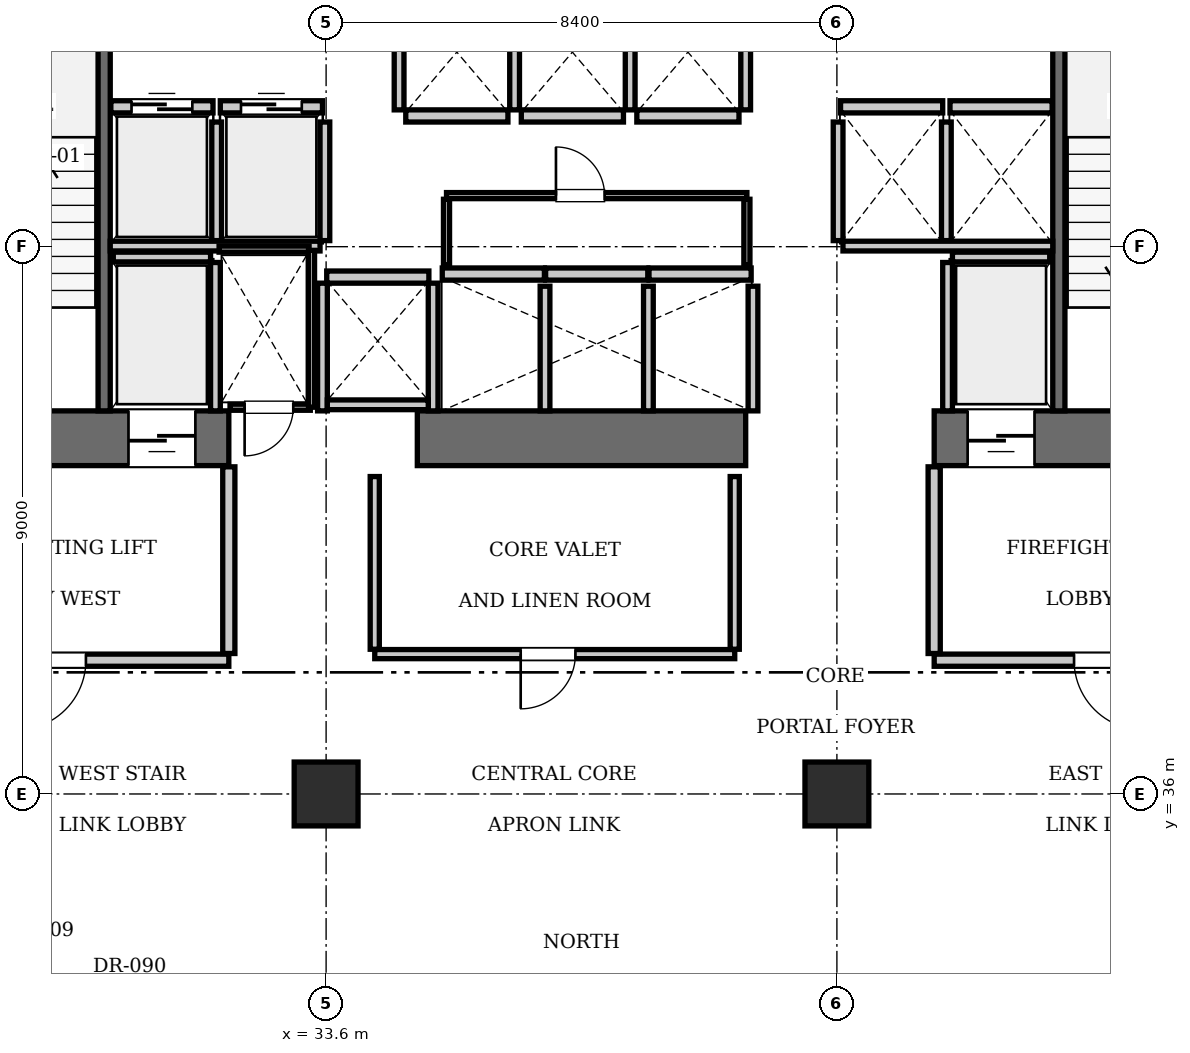
"""IFC4 building model, lengths in metres.
Left out: names, types, materials, properties, quantities, classifications, styles, units other than length and angle.
Written with IfcOpenShell. Run it as: python <this file> out.ifc"""

import sys

from ifc_helpers import new_model, si_unit, direction, frame, frame_2d, origin, origin_2d, place, context, subcontext, project, spatial, rectangle, extrude, element, fill, save


model = new_model("IFC4")
c1 = context("Model", 3, precision=1e-05, world=origin(), true_north=direction((0.0, 1.0)))
c2 = subcontext(c1, "Body", "Model", "MODEL_VIEW")
j1 = project(units=[si_unit("LENGTHUNIT", "METRE"), si_unit("PLANEANGLEUNIT", "RADIAN")], contexts=[c1])
p1 = place(None, origin())
s1 = spatial("IfcSite", under=j1, at=p1, CompositionType="ELEMENT")
p2 = place(p1, origin())
s2 = spatial("IfcBuilding", under=s1, at=p2, CompositionType="ELEMENT")
p3 = place(p2, frame((0.0, 0.0, 30.8)))
s3 = spatial("IfcBuildingStorey", under=s2, at=p3, CompositionType="ELEMENT", Elevation=30.8)
p4 = place(p3, frame((25.2, 41.85, 0.0), z_axis=(0.0, 0.0, 1.0), x_axis=(1.0, 0.0, 0.0)))
e1 = element("IfcWall", 1, at=p4, inside=s3, PredefinedType="SHEAR", context=c2, shape_type="SweptSolid", body=[
    extrude(rectangle(XDim=6.8, YDim=0.9, at=frame_2d((3.4, 0.0))), origin(), (0.0, 0.0, 1.0), 3.85),
])
p5 = place(p4, frame((1.65, 0.0, 0.0)))
e2 = element("IfcOpeningElement", 2, at=p5, cuts=e1, PredefinedType="OPENING", context=c2, shape_type="SweptSolid", body=[
    extrude(rectangle(XDim=1.15, YDim=2.15, at=frame_2d((0.575, 1.075))), frame((0.0, 0.46, 0.0), z_axis=(0.0, -1.0, 0.0), x_axis=(1.0, 0.0, 0.0)), (0.0, 0.0, 1.0), 0.92),
])
p6 = place(p4, frame((5.15, 0.0, 0.0)))
e3 = element("IfcOpeningElement", 3, at=p6, cuts=e1, PredefinedType="OPENING", context=c2, shape_type="SweptSolid", body=[
    extrude(rectangle(XDim=1.1, YDim=2.2, at=frame_2d((0.55, 1.1))), frame((0.0, 0.46, 0.0), z_axis=(0.0, -1.0, 0.0), x_axis=(1.0, 0.0, 0.0)), (0.0, 0.0, 1.0), 0.92),
])
p7 = place(p3, frame((35.1, 41.85, 0.0), z_axis=(0.0, 0.0, 1.0), x_axis=(1.0, 0.0, 0.0)))
e4 = element("IfcWall", 4, at=p7, inside=s3, PredefinedType="SHEAR", context=c2, shape_type="SweptSolid", body=[
    extrude(rectangle(XDim=5.4, YDim=0.9, at=frame_2d((2.7, 0.0))), origin(), (0.0, 0.0, 1.0), 3.85),
])
p8 = place(p3, frame((43.6, 41.85, 0.0), z_axis=(0.0, 0.0, 1.0), x_axis=(1.0, 0.0, 0.0)))
e5 = element("IfcWall", 5, at=p8, inside=s3, PredefinedType="SHEAR", context=c2, shape_type="SweptSolid", body=[
    extrude(rectangle(XDim=6.8, YDim=0.9, at=frame_2d((3.4, 0.0))), origin(), (0.0, 0.0, 1.0), 3.85),
])
p9 = place(p8, frame((3.9, 0.0, 0.0)))
e6 = element("IfcOpeningElement", 6, at=p9, cuts=e5, PredefinedType="OPENING", context=c2, shape_type="SweptSolid", body=[
    extrude(rectangle(XDim=1.15, YDim=2.15, at=frame_2d((0.575, 1.075))), frame((0.0, 0.46, 0.0), z_axis=(0.0, -1.0, 0.0), x_axis=(1.0, 0.0, 0.0)), (0.0, 0.0, 1.0), 0.92),
])
p10 = place(p8, frame((0.55, 0.0, 0.0)))
e7 = element("IfcOpeningElement", 7, at=p10, cuts=e5, PredefinedType="OPENING", context=c2, shape_type="SweptSolid", body=[
    extrude(rectangle(XDim=1.1, YDim=2.2, at=frame_2d((0.55, 1.1))), frame((0.0, 0.46, 0.0), z_axis=(0.0, -1.0, 0.0), x_axis=(1.0, 0.0, 0.0)), (0.0, 0.0, 1.0), 0.92),
])
for number, where, z_axis, x_axis in (
    (8, (33.6, 36.0, 0.0), (0.0, 0.0, 1.0), (1.0, 0.0, 0.0)),
    (9, (42.0, 36.0, 0.0), (0.0, 0.0, 1.0), (1.0, 0.0, 0.0)),
):
    element("IfcColumn", number, at=place(p3, frame(where, z_axis=z_axis, x_axis=x_axis)), inside=s3, PredefinedType="COLUMN", context=c2, shape_type="SweptSolid", body=[
        extrude(rectangle(XDim=1.05, YDim=1.05, at=origin_2d()), origin(), (0.0, 0.0, 1.0), 3.85),
    ])
for number, where, z_axis, x_axis in (
    (10, (29.95, 42.3, 0.0), (0.0, 0.0, 1.0), (0.0, 1.0, 0.0)),
    (11, (45.65, 42.3, 0.0), (0.0, 0.0, 1.0), (0.0, 1.0, 0.0)),
):
    element("IfcWall", number, at=place(p3, frame(where, z_axis=z_axis, x_axis=x_axis)), inside=s3, PredefinedType="SOLIDWALL", context=c2, shape_type="SweptSolid", body=[
        extrude(rectangle(XDim=8.85, YDim=0.2, at=frame_2d((4.425, 0.0))), origin(), (0.0, 0.0, 1.0), 3.61),
    ])
p11 = place(p3, frame((30.06, 47.3, 0.0), z_axis=(0.0, 0.0, 1.0), x_axis=(1.0, 0.0, 0.0)))
e12 = element("IfcWall", 12, at=p11, inside=s3, PredefinedType="SOLIDWALL", context=c2, shape_type="SweptSolid", body=[
    extrude(rectangle(XDim=1.68, YDim=0.2, at=frame_2d((0.84, 0.0))), origin(), (0.0, 0.0, 1.0), 3.61),
])
p12 = place(p11, frame((0.34, 0.0, 0.0)))
e13 = element("IfcOpeningElement", 13, at=p12, cuts=e12, PredefinedType="OPENING", context=c2, shape_type="SweptSolid", body=[
    extrude(rectangle(XDim=1.0, YDim=2.15, at=frame_2d((0.5, 1.075))), frame((0.0, 0.11, 0.0), z_axis=(0.0, -1.0, 0.0), x_axis=(1.0, 0.0, 0.0)), (0.0, 0.0, 1.0), 0.22),
])
p13 = place(p3, frame((31.86, 47.3, 0.0), z_axis=(0.0, 0.0, 1.0), x_axis=(1.0, 0.0, 0.0)))
e14 = element("IfcWall", 14, at=p13, inside=s3, PredefinedType="SOLIDWALL", context=c2, shape_type="SweptSolid", body=[
    extrude(rectangle(XDim=1.68, YDim=0.2, at=frame_2d((0.84, 0.0))), origin(), (0.0, 0.0, 1.0), 3.61),
])
p14 = place(p13, frame((0.34, 0.0, 0.0)))
e15 = element("IfcOpeningElement", 15, at=p14, cuts=e14, PredefinedType="OPENING", context=c2, shape_type="SweptSolid", body=[
    extrude(rectangle(XDim=1.0, YDim=2.15, at=frame_2d((0.5, 1.075))), frame((0.0, 0.11, 0.0), z_axis=(0.0, -1.0, 0.0), x_axis=(1.0, 0.0, 0.0)), (0.0, 0.0, 1.0), 0.22),
])
for number, where, z_axis, x_axis in (
    (16, (42.06, 47.3, 0.0), (0.0, 0.0, 1.0), (1.0, 0.0, 0.0)),
    (17, (43.86, 47.3, 0.0), (0.0, 0.0, 1.0), (1.0, 0.0, 0.0)),
    (18, (35.51, 44.55, 0.0), (0.0, 0.0, 1.0), (1.0, 0.0, 0.0)),
    (19, (37.21, 44.55, 0.0), (0.0, 0.0, 1.0), (1.0, 0.0, 0.0)),
):
    element("IfcWall", number, at=place(p3, frame(where, z_axis=z_axis, x_axis=x_axis)), inside=s3, PredefinedType="SOLIDWALL", context=c2, shape_type="SweptSolid", body=[
        extrude(rectangle(XDim=1.68, YDim=0.2, at=frame_2d((0.84, 0.0))), origin(), (0.0, 0.0, 1.0), 3.61),
    ])
for number, where, z_axis, x_axis in (
    (20, (38.91, 44.55, 0.0), (0.0, 0.0, 1.0), (1.0, 0.0, 0.0)),
    (21, (34.91, 47.15, 0.0), (0.0, 0.0, 1.0), (1.0, 0.0, 0.0)),
):
    element("IfcWall", number, at=place(p3, frame(where, z_axis=z_axis, x_axis=x_axis)), inside=s3, PredefinedType="SOLIDWALL", context=c2, shape_type="SweptSolid", body=[
        extrude(rectangle(XDim=1.68, YDim=0.2, at=frame_2d((0.84, 0.0))), origin(), (0.0, 0.0, 1.0), 3.61),
    ])
for number, where, z_axis, x_axis in (
    (22, (36.81, 47.15, 0.0), (0.0, 0.0, 1.0), (1.0, 0.0, 0.0)),
    (23, (38.71, 47.15, 0.0), (0.0, 0.0, 1.0), (1.0, 0.0, 0.0)),
    (24, (33.61, 44.5, 0.0), (0.0, 0.0, 1.0), (1.0, 0.0, 0.0)),
):
    element("IfcWall", number, at=place(p3, frame(where, z_axis=z_axis, x_axis=x_axis)), inside=s3, PredefinedType="SOLIDWALL", context=c2, shape_type="SweptSolid", body=[
        extrude(rectangle(XDim=1.68, YDim=0.2, at=frame_2d((0.84, 0.0))), origin(), (0.0, 0.0, 1.0), 3.61),
    ])
p15 = place(p3, frame((30.1, 44.83, 0.0), z_axis=(0.0, 0.0, 1.0), x_axis=(1.0, 0.0, 0.0)))
e25 = element("IfcWall", 25, at=p15, inside=s3, PredefinedType="SOLIDWALL", context=c2, shape_type="SweptSolid", body=[
    extrude(rectangle(XDim=1.6, YDim=0.16, at=frame_2d((0.8, 0.0))), origin(), (0.0, 0.0, 1.0), 3.61),
])
p16 = place(p3, frame((31.78, 42.3, 0.0), z_axis=(0.0, 0.0, 1.0), x_axis=(0.0, 1.0, 0.0)))
e26 = element("IfcWall", 26, at=p16, inside=s3, PredefinedType="SOLIDWALL", context=c2, shape_type="SweptSolid", body=[
    extrude(rectangle(XDim=2.44, YDim=0.16, at=frame_2d((1.22, 0.0))), origin(), (0.0, 0.0, 1.0), 3.61),
])
p17 = place(p3, frame((43.9, 44.83, 0.0), z_axis=(0.0, 0.0, 1.0), x_axis=(1.0, 0.0, 0.0)))
e27 = element("IfcWall", 27, at=p17, inside=s3, PredefinedType="SOLIDWALL", context=c2, shape_type="SweptSolid", body=[
    extrude(rectangle(XDim=1.6, YDim=0.16, at=frame_2d((0.8, 0.0))), origin(), (0.0, 0.0, 1.0), 3.61),
])
p18 = place(p3, frame((43.82, 42.3, 0.0), z_axis=(0.0, 0.0, 1.0), x_axis=(0.0, 1.0, 0.0)))
e28 = element("IfcWall", 28, at=p18, inside=s3, PredefinedType="SOLIDWALL", context=c2, shape_type="SweptSolid", body=[
    extrude(rectangle(XDim=2.44, YDim=0.16, at=frame_2d((1.22, 0.0))), origin(), (0.0, 0.0, 1.0), 3.61),
])
for number, where, z_axis, x_axis in (
    (29, (31.8, 45.1, 0.0), (0.0, 0.0, 1.0), (0.0, 1.0, 0.0)),
    (30, (33.58, 45.1, 0.0), (0.0, 0.0, 1.0), (0.0, 1.0, 0.0)),
):
    element("IfcWall", number, at=place(p3, frame(where, z_axis=z_axis, x_axis=x_axis)), inside=s3, PredefinedType="SOLIDWALL", context=c2, shape_type="SweptSolid", body=[
        extrude(rectangle(XDim=1.95, YDim=0.16, at=frame_2d((0.975, 0.0))), origin(), (0.0, 0.0, 1.0), 3.61),
    ])
p19 = place(p3, frame((30.05, 45.01, 0.0), z_axis=(0.0, 0.0, 1.0), x_axis=(1.0, 0.0, 0.0)))
e31 = element("IfcWall", 31, at=p19, inside=s3, PredefinedType="SOLIDWALL", context=c2, shape_type="SweptSolid", body=[
    extrude(rectangle(XDim=3.45, YDim=0.16, at=frame_2d((1.725, 0.0))), origin(), (0.0, 0.0, 1.0), 3.61),
])
for number, where, z_axis, x_axis in (
    (32, (42.02, 45.1, 0.0), (0.0, 0.0, 1.0), (0.0, 1.0, 0.0)),
    (33, (43.8, 45.1, 0.0), (0.0, 0.0, 1.0), (0.0, 1.0, 0.0)),
):
    element("IfcWall", number, at=place(p3, frame(where, z_axis=z_axis, x_axis=x_axis)), inside=s3, PredefinedType="SOLIDWALL", context=c2, shape_type="SweptSolid", body=[
        extrude(rectangle(XDim=1.95, YDim=0.16, at=frame_2d((0.975, 0.0))), origin(), (0.0, 0.0, 1.0), 3.61),
    ])
p20 = place(p3, frame((42.1, 45.01, 0.0), z_axis=(0.0, 0.0, 1.0), x_axis=(1.0, 0.0, 0.0)))
e34 = element("IfcWall", 34, at=p20, inside=s3, PredefinedType="SOLIDWALL", context=c2, shape_type="SweptSolid", body=[
    extrude(rectangle(XDim=3.45, YDim=0.16, at=frame_2d((1.725, 0.0))), origin(), (0.0, 0.0, 1.0), 3.61),
])
for number, where, z_axis, x_axis in (
    (35, (37.2, 42.3, 0.0), (0.0, 0.0, 1.0), (0.0, 1.0, 0.0)),
    (36, (38.9, 42.3, 0.0), (0.0, 0.0, 1.0), (0.0, 1.0, 0.0)),
    (37, (40.62, 42.3, 0.0), (0.0, 0.0, 1.0), (0.0, 1.0, 0.0)),
):
    element("IfcWall", number, at=place(p3, frame(where, z_axis=z_axis, x_axis=x_axis)), inside=s3, PredefinedType="SOLIDWALL", context=c2, shape_type="SweptSolid", body=[
        extrude(rectangle(XDim=2.05, YDim=0.16, at=frame_2d((1.025, 0.0))), origin(), (0.0, 0.0, 1.0), 3.61),
    ])
for number, where, z_axis, x_axis in (
    (38, (34.8, 47.25, 0.0), (0.0, 0.0, 1.0), (0.0, 1.0, 0.0)),
    (39, (36.7, 47.25, 0.0), (0.0, 0.0, 1.0), (0.0, 1.0, 0.0)),
    (40, (38.6, 47.25, 0.0), (0.0, 0.0, 1.0), (0.0, 1.0, 0.0)),
    (41, (40.5, 47.25, 0.0), (0.0, 0.0, 1.0), (0.0, 1.0, 0.0)),
):
    element("IfcWall", number, at=place(p3, frame(where, z_axis=z_axis, x_axis=x_axis)), inside=s3, PredefinedType="SOLIDWALL", context=c2, shape_type="SweptSolid", body=[
        extrude(rectangle(XDim=2.19, YDim=0.16, at=frame_2d((1.095, 0.0))), origin(), (0.0, 0.0, 1.0), 3.61),
    ])
for number, where, z_axis, x_axis in (
    (42, (33.54, 42.3, 0.0), (0.0, 0.0, 1.0), (0.0, 1.0, 0.0)),
    (43, (35.36, 42.3, 0.0), (0.0, 0.0, 1.0), (0.0, 1.0, 0.0)),
):
    element("IfcWall", number, at=place(p3, frame(where, z_axis=z_axis, x_axis=x_axis)), inside=s3, PredefinedType="SOLIDWALL", context=c2, shape_type="SweptSolid", body=[
        extrude(rectangle(XDim=2.1, YDim=0.16, at=frame_2d((1.05, 0.0))), origin(), (0.0, 0.0, 1.0), 3.61),
    ])
p21 = place(p3, frame((33.62, 42.4, 0.0), z_axis=(0.0, 0.0, 1.0), x_axis=(1.0, 0.0, 0.0)))
e44 = element("IfcWall", 44, at=p21, inside=s3, PredefinedType="SOLIDWALL", context=c2, shape_type="SweptSolid", body=[
    extrude(rectangle(XDim=1.66, YDim=0.16, at=frame_2d((0.83, 0.0))), origin(), (0.0, 0.0, 1.0), 3.61),
])
p22 = place(p3, frame((26.2, 38.2, 0.0), z_axis=(0.0, 0.0, 1.0), x_axis=(1.0, 0.0, 0.0)))
e45 = element("IfcWall", 45, at=p22, inside=s3, PredefinedType="PARTITIONING", context=c2, shape_type="SweptSolid", body=[
    extrude(rectangle(XDim=5.8, YDim=0.2, at=frame_2d((2.9, 0.0))), origin(), (0.0, 0.0, 1.0), 3.61),
])
p23 = place(p22, frame((2.3, 0.0, 0.0)))
e46 = element("IfcOpeningElement", 46, at=p23, cuts=e45, PredefinedType="OPENING", context=c2, shape_type="SweptSolid", body=[
    extrude(rectangle(XDim=1.15, YDim=2.15, at=frame_2d((0.575, 1.075))), frame((0.0, 0.11, 0.0), z_axis=(0.0, -1.0, 0.0), x_axis=(1.0, 0.0, 0.0)), (0.0, 0.0, 1.0), 0.22),
])
p24 = place(p3, frame((32.0, 38.31, 0.0), z_axis=(0.0, 0.0, 1.0), x_axis=(0.0, 1.0, 0.0)))
e47 = element("IfcWall", 47, at=p24, inside=s3, PredefinedType="PARTITIONING", context=c2, shape_type="SweptSolid", body=[
    extrude(rectangle(XDim=3.07, YDim=0.2, at=frame_2d((1.535, 0.0))), origin(), (0.0, 0.0, 1.0), 3.61),
])
p25 = place(p3, frame((43.6, 38.2, 0.0), z_axis=(0.0, 0.0, 1.0), x_axis=(1.0, 0.0, 0.0)))
e48 = element("IfcWall", 48, at=p25, inside=s3, PredefinedType="PARTITIONING", context=c2, shape_type="SweptSolid", body=[
    extrude(rectangle(XDim=5.8, YDim=0.2, at=frame_2d((2.9, 0.0))), origin(), (0.0, 0.0, 1.0), 3.61),
])
p26 = place(p25, frame((2.3, 0.0, 0.0)))
e49 = element("IfcOpeningElement", 49, at=p26, cuts=e48, PredefinedType="OPENING", context=c2, shape_type="SweptSolid", body=[
    extrude(rectangle(XDim=1.15, YDim=2.15, at=frame_2d((0.575, 1.075))), frame((0.0, 0.11, 0.0), z_axis=(0.0, -1.0, 0.0), x_axis=(1.0, 0.0, 0.0)), (0.0, 0.0, 1.0), 0.22),
])
p27 = place(p3, frame((43.6, 38.31, 0.0), z_axis=(0.0, 0.0, 1.0), x_axis=(0.0, 1.0, 0.0)))
e50 = element("IfcWall", 50, at=p27, inside=s3, PredefinedType="PARTITIONING", context=c2, shape_type="SweptSolid", body=[
    extrude(rectangle(XDim=3.07, YDim=0.2, at=frame_2d((1.535, 0.0))), origin(), (0.0, 0.0, 1.0), 3.61),
])
p28 = place(p3, frame((32.02, 42.36, 0.0), z_axis=(0.0, 0.0, 1.0), x_axis=(1.0, 0.0, 0.0)))
e51 = element("IfcWall", 51, at=p28, inside=s3, PredefinedType="PARTITIONING", context=c2, shape_type="SweptSolid", body=[
    extrude(rectangle(XDim=1.32, YDim=0.1, at=frame_2d((0.66, 0.0))), origin(), (0.0, 0.0, 1.0), 3.61),
])
p29 = place(p28, frame((0.24, 0.0, 0.0)))
e52 = element("IfcOpeningElement", 52, at=p29, cuts=e51, PredefinedType="OPENING", context=c2, shape_type="SweptSolid", body=[
    extrude(rectangle(XDim=0.8, YDim=2.05, at=frame_2d((0.4, 1.025))), frame((0.0, 0.06, 0.0), z_axis=(0.0, -1.0, 0.0), x_axis=(1.0, 0.0, 0.0)), (0.0, 0.0, 1.0), 0.12),
])
p30 = place(p3, frame((31.84, 44.96, 0.0), z_axis=(0.0, 0.0, 1.0), x_axis=(1.0, 0.0, 0.0)))
e53 = element("IfcWall", 53, at=p30, inside=s3, PredefinedType="PARTITIONING", context=c2, shape_type="SweptSolid", body=[
    extrude(rectangle(XDim=1.48, YDim=0.1, at=frame_2d((0.74, 0.0))), origin(), (0.0, 0.0, 1.0), 3.61),
])
p31 = place(p3, frame((33.36, 42.36, 0.0), z_axis=(0.0, 0.0, 1.0), x_axis=(0.0, 1.0, 0.0)))
e54 = element("IfcWall", 54, at=p31, inside=s3, PredefinedType="PARTITIONING", context=c2, shape_type="SweptSolid", body=[
    extrude(rectangle(XDim=2.58, YDim=0.1, at=frame_2d((1.29, 0.0))), origin(), (0.0, 0.0, 1.0), 3.61),
])
p32 = place(p3, frame((35.58, 45.84, 0.0), z_axis=(0.0, 0.0, 1.0), x_axis=(1.0, 0.0, 0.0)))
e55 = element("IfcWall", 55, at=p32, inside=s3, PredefinedType="PARTITIONING", context=c2, shape_type="SweptSolid", body=[
    extrude(rectangle(XDim=4.94, YDim=0.1, at=frame_2d((2.47, 0.0))), origin(), (0.0, 0.0, 1.0), 3.61),
])
p33 = place(p32, frame((1.8, 0.0, 0.0)))
e56 = element("IfcOpeningElement", 56, at=p33, cuts=e55, PredefinedType="OPENING", context=c2, shape_type="SweptSolid", body=[
    extrude(rectangle(XDim=0.8, YDim=2.05, at=frame_2d((0.4, 1.025))), frame((0.0, 0.06, 0.0), z_axis=(0.0, -1.0, 0.0), x_axis=(1.0, 0.0, 0.0)), (0.0, 0.0, 1.0), 0.12),
])
for number, where, z_axis, x_axis in (
    (57, (35.58, 44.7, 0.0), (0.0, 0.0, 1.0), (0.0, 1.0, 0.0)),
    (58, (40.52, 44.7, 0.0), (0.0, 0.0, 1.0), (0.0, 1.0, 0.0)),
):
    element("IfcWall", number, at=place(p3, frame(where, z_axis=z_axis, x_axis=x_axis)), inside=s3, PredefinedType="PARTITIONING", context=c2, shape_type="SweptSolid", body=[
        extrude(rectangle(XDim=1.08, YDim=0.1, at=frame_2d((0.54, 0.0))), origin(), (0.0, 0.0, 1.0), 3.61),
    ])
p34 = place(p3, frame((34.4, 38.3, 0.0), z_axis=(0.0, 0.0, 1.0), x_axis=(1.0, 0.0, 0.0)))
e59 = element("IfcWall", 59, at=p34, inside=s3, PredefinedType="PARTITIONING", context=c2, shape_type="SweptSolid", body=[
    extrude(rectangle(XDim=5.92, YDim=0.15, at=frame_2d((2.96, 0.0))), origin(), (0.0, 0.0, 1.0), 3.61),
])
p35 = place(p34, frame((2.4, 0.0, 0.0)))
e60 = element("IfcOpeningElement", 60, at=p35, cuts=e59, PredefinedType="OPENING", context=c2, shape_type="SweptSolid", body=[
    extrude(rectangle(XDim=0.9, YDim=2.1, at=frame_2d((0.45, 1.05))), frame((0.0, 0.085, 0.0), z_axis=(0.0, -1.0, 0.0), x_axis=(1.0, 0.0, 0.0)), (0.0, 0.0, 1.0), 0.17),
])
for number, where, z_axis, x_axis in (
    (61, (34.4, 38.38, 0.0), (0.0, 0.0, 1.0), (0.0, 1.0, 0.0)),
    (62, (40.32, 38.38, 0.0), (0.0, 0.0, 1.0), (0.0, 1.0, 0.0)),
):
    element("IfcWall", number, at=place(p3, frame(where, z_axis=z_axis, x_axis=x_axis)), inside=s3, PredefinedType="PARTITIONING", context=c2, shape_type="SweptSolid", body=[
        extrude(rectangle(XDim=2.84, YDim=0.15, at=frame_2d((1.42, 0.0))), origin(), (0.0, 0.0, 1.0), 3.61),
    ])
p36 = place(p12, origin())
e63 = element("IfcDoor", 63, at=p36, inside=s3, OperationType="SLIDING_TO_LEFT", PredefinedType="DOOR", context=c2, shape_type="SweptSolid", body=[
    extrude(rectangle(XDim=1.0, YDim=2.15, at=frame_2d((0.5, 1.075))), frame((0.0, 0.025, 0.0), z_axis=(0.0, -1.0, 0.0), x_axis=(1.0, 0.0, 0.0)), (0.0, 0.0, 1.0), 0.05),
])
fill(e13, e63)
p37 = place(p14, origin())
e64 = element("IfcDoor", 64, at=p37, inside=s3, OperationType="SLIDING_TO_LEFT", PredefinedType="DOOR", context=c2, shape_type="SweptSolid", body=[
    extrude(rectangle(XDim=1.0, YDim=2.15, at=frame_2d((0.5, 1.075))), frame((0.0, 0.025, 0.0), z_axis=(0.0, -1.0, 0.0), x_axis=(1.0, 0.0, 0.0)), (0.0, 0.0, 1.0), 0.05),
])
fill(e15, e64)
p38 = place(p6, frame((1.1, 0.0, 0.0), z_axis=(0.0, 0.0, 1.0), x_axis=(-1.0, 0.0, 0.0)))
e65 = element("IfcDoor", 65, at=p38, inside=s3, OperationType="SLIDING_TO_LEFT", PredefinedType="DOOR", context=c2, shape_type="SweptSolid", body=[
    extrude(rectangle(XDim=1.1, YDim=2.2, at=frame_2d((0.55, 1.1))), frame((0.0, 0.025, 0.0), z_axis=(0.0, -1.0, 0.0), x_axis=(1.0, 0.0, 0.0)), (0.0, 0.0, 1.0), 0.05),
])
fill(e3, e65)
p39 = place(p10, frame((1.1, 0.0, 0.0), z_axis=(0.0, 0.0, 1.0), x_axis=(-1.0, 0.0, 0.0)))
e66 = element("IfcDoor", 66, at=p39, inside=s3, OperationType="SLIDING_TO_LEFT", PredefinedType="DOOR", context=c2, shape_type="SweptSolid", body=[
    extrude(rectangle(XDim=1.1, YDim=2.2, at=frame_2d((0.55, 1.1))), frame((0.0, 0.025, 0.0), z_axis=(0.0, -1.0, 0.0), x_axis=(1.0, 0.0, 0.0)), (0.0, 0.0, 1.0), 0.05),
])
fill(e7, e66)
p40 = place(p23, frame((1.15, 0.0, 0.0), z_axis=(0.0, 0.0, 1.0), x_axis=(-1.0, 0.0, 0.0)))
e67 = element("IfcDoor", 67, at=p40, inside=s3, OperationType="SINGLE_SWING_RIGHT", PredefinedType="DOOR", context=c2, shape_type="SweptSolid", body=[
    extrude(rectangle(XDim=1.15, YDim=2.15, at=frame_2d((0.575, 1.075))), frame((0.0, 0.025, 0.0), z_axis=(0.0, -1.0, 0.0), x_axis=(1.0, 0.0, 0.0)), (0.0, 0.0, 1.0), 0.05),
])
fill(e46, e67)
p41 = place(p26, frame((1.15, 0.0, 0.0), z_axis=(0.0, 0.0, 1.0), x_axis=(-1.0, 0.0, 0.0)))
e68 = element("IfcDoor", 68, at=p41, inside=s3, OperationType="SINGLE_SWING_LEFT", PredefinedType="DOOR", context=c2, shape_type="SweptSolid", body=[
    extrude(rectangle(XDim=1.15, YDim=2.15, at=frame_2d((0.575, 1.075))), frame((0.0, 0.025, 0.0), z_axis=(0.0, -1.0, 0.0), x_axis=(1.0, 0.0, 0.0)), (0.0, 0.0, 1.0), 0.05),
])
fill(e49, e68)
p42 = place(p29, frame((0.8, 0.0, 0.0), z_axis=(0.0, 0.0, 1.0), x_axis=(-1.0, 0.0, 0.0)))
e69 = element("IfcDoor", 69, at=p42, inside=s3, OperationType="SINGLE_SWING_RIGHT", PredefinedType="DOOR", context=c2, shape_type="SweptSolid", body=[
    extrude(rectangle(XDim=0.8, YDim=2.05, at=frame_2d((0.4, 1.025))), frame((0.0, 0.025, 0.0), z_axis=(0.0, -1.0, 0.0), x_axis=(1.0, 0.0, 0.0)), (0.0, 0.0, 1.0), 0.05),
])
fill(e52, e69)
p43 = place(p33, origin())
e70 = element("IfcDoor", 70, at=p43, inside=s3, OperationType="SINGLE_SWING_LEFT", PredefinedType="DOOR", context=c2, shape_type="SweptSolid", body=[
    extrude(rectangle(XDim=0.8, YDim=2.05, at=frame_2d((0.4, 1.025))), frame((0.0, 0.025, 0.0), z_axis=(0.0, -1.0, 0.0), x_axis=(1.0, 0.0, 0.0)), (0.0, 0.0, 1.0), 0.05),
])
fill(e56, e70)
p44 = place(p35, frame((0.9, 0.0, 0.0), z_axis=(0.0, 0.0, 1.0), x_axis=(-1.0, 0.0, 0.0)))
e71 = element("IfcDoor", 71, at=p44, inside=s3, OperationType="SINGLE_SWING_RIGHT", PredefinedType="DOOR", context=c2, shape_type="SweptSolid", body=[
    extrude(rectangle(XDim=0.9, YDim=2.1, at=frame_2d((0.45, 1.05))), frame((0.0, 0.025, 0.0), z_axis=(0.0, -1.0, 0.0), x_axis=(1.0, 0.0, 0.0)), (0.0, 0.0, 1.0), 0.05),
])
fill(e60, e71)
save(model, sys.argv[1])
